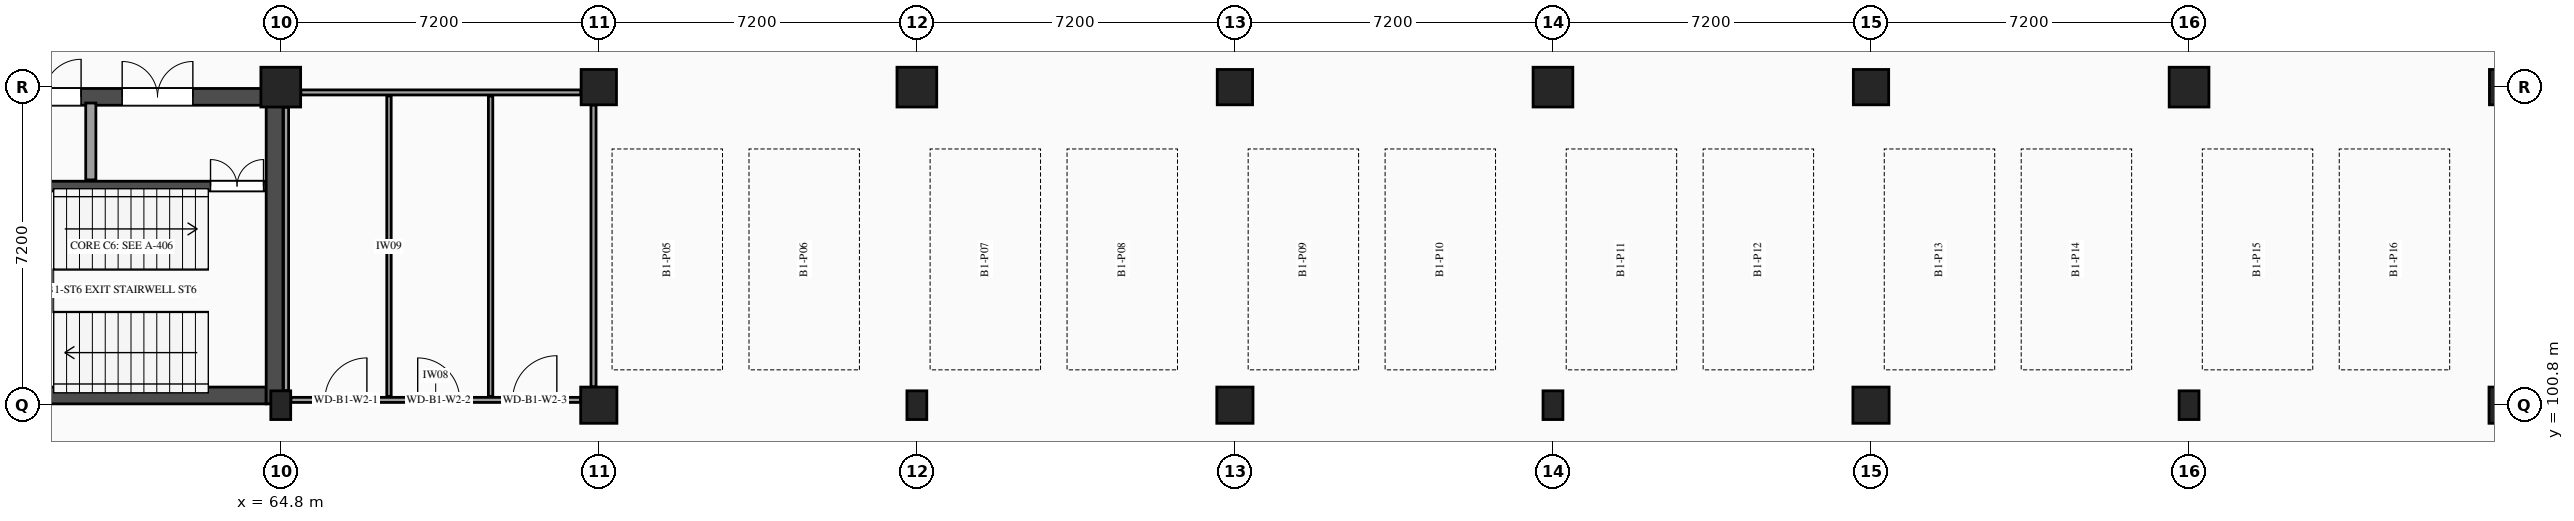
"""IFC4 building model, lengths in metres.
Left out: names, types, materials, properties, quantities, classifications, styles, units other than length and angle.
Written with IfcOpenShell. Run it as: python <this file> out.ifc"""

import sys

from ifc_helpers import new_model, si_unit, direction, frame, frame_2d, origin, origin_2d, place, context, subcontext, project, spatial, rectangle, extrude, element, fill, save


model = new_model("IFC4")
c1 = context("Model", 3, precision=1e-05, world=origin(), true_north=direction((0.0, 1.0)))
c2 = subcontext(c1, "Body", "Model", "MODEL_VIEW")
j1 = project(units=[si_unit("LENGTHUNIT", "METRE"), si_unit("PLANEANGLEUNIT", "RADIAN")], contexts=[c1])
p1 = place(None, origin())
s1 = spatial("IfcSite", under=j1, at=p1, CompositionType="ELEMENT")
p2 = place(p1, origin())
s2 = spatial("IfcBuilding", under=s1, at=p2, CompositionType="ELEMENT")
p3 = place(p2, frame((0.0, 0.0, -4.5)))
s3 = spatial("IfcBuildingStorey", under=s2, at=p3, CompositionType="ELEMENT", Elevation=-4.5)
p4 = place(p3, frame((64.8, 100.8, -0.45), z_axis=(0.0, 0.0, 1.0), x_axis=(1.0, 0.0, 0.0)))
e1 = element("IfcColumn", 1, at=p4, inside=s3, PredefinedType="PILASTER", context=c2, shape_type="SweptSolid", body=[
    extrude(rectangle(XDim=0.45, YDim=0.65, at=origin_2d()), origin(), (0.0, 0.0, 1.0), 4.95),
])
p5 = place(p3, frame((64.8, 108.0, -0.45), z_axis=(0.0, 0.0, 1.0), x_axis=(1.0, 0.0, 0.0)))
e2 = element("IfcColumn", 2, at=p5, inside=s3, PredefinedType="COLUMN", context=c2, shape_type="SweptSolid", body=[
    extrude(rectangle(XDim=0.9, YDim=0.9, at=origin_2d()), origin(), (0.0, 0.0, 1.0), 4.95),
])
p6 = place(p3, frame((72.0, 100.8, -0.45), z_axis=(0.0, 0.0, 1.0), x_axis=(1.0, 0.0, 0.0)))
e3 = element("IfcColumn", 3, at=p6, inside=s3, PredefinedType="COLUMN", context=c2, shape_type="SweptSolid", body=[
    extrude(rectangle(XDim=0.82, YDim=0.82, at=origin_2d()), origin(), (0.0, 0.0, 1.0), 4.95),
])
p7 = place(p3, frame((72.0, 108.0, -0.45), z_axis=(0.0, 0.0, 1.0), x_axis=(1.0, 0.0, 0.0)))
e4 = element("IfcColumn", 4, at=p7, inside=s3, PredefinedType="COLUMN", context=c2, shape_type="SweptSolid", body=[
    extrude(rectangle(XDim=0.8, YDim=0.8, at=origin_2d()), origin(), (0.0, 0.0, 1.0), 4.95),
])
p8 = place(p3, frame((79.2, 100.8, -0.45), z_axis=(0.0, 0.0, 1.0), x_axis=(1.0, 0.0, 0.0)))
e5 = element("IfcColumn", 5, at=p8, inside=s3, PredefinedType="PILASTER", context=c2, shape_type="SweptSolid", body=[
    extrude(rectangle(XDim=0.45, YDim=0.65, at=origin_2d()), origin(), (0.0, 0.0, 1.0), 4.95),
])
p9 = place(p3, frame((79.2, 108.0, -0.45), z_axis=(0.0, 0.0, 1.0), x_axis=(1.0, 0.0, 0.0)))
e6 = element("IfcColumn", 6, at=p9, inside=s3, PredefinedType="COLUMN", context=c2, shape_type="SweptSolid", body=[
    extrude(rectangle(XDim=0.9, YDim=0.9, at=origin_2d()), origin(), (0.0, 0.0, 1.0), 4.95),
])
p10 = place(p3, frame((86.4, 100.8, -0.45), z_axis=(0.0, 0.0, 1.0), x_axis=(1.0, 0.0, 0.0)))
e7 = element("IfcColumn", 7, at=p10, inside=s3, PredefinedType="COLUMN", context=c2, shape_type="SweptSolid", body=[
    extrude(rectangle(XDim=0.82, YDim=0.82, at=origin_2d()), origin(), (0.0, 0.0, 1.0), 4.95),
])
p11 = place(p3, frame((86.4, 108.0, -0.45), z_axis=(0.0, 0.0, 1.0), x_axis=(1.0, 0.0, 0.0)))
e8 = element("IfcColumn", 8, at=p11, inside=s3, PredefinedType="COLUMN", context=c2, shape_type="SweptSolid", body=[
    extrude(rectangle(XDim=0.8, YDim=0.8, at=origin_2d()), origin(), (0.0, 0.0, 1.0), 4.95),
])
p12 = place(p3, frame((93.6, 100.8, -0.45), z_axis=(0.0, 0.0, 1.0), x_axis=(1.0, 0.0, 0.0)))
e9 = element("IfcColumn", 9, at=p12, inside=s3, PredefinedType="PILASTER", context=c2, shape_type="SweptSolid", body=[
    extrude(rectangle(XDim=0.45, YDim=0.65, at=origin_2d()), origin(), (0.0, 0.0, 1.0), 4.95),
])
p13 = place(p3, frame((93.6, 108.0, -0.45), z_axis=(0.0, 0.0, 1.0), x_axis=(1.0, 0.0, 0.0)))
e10 = element("IfcColumn", 10, at=p13, inside=s3, PredefinedType="COLUMN", context=c2, shape_type="SweptSolid", body=[
    extrude(rectangle(XDim=0.9, YDim=0.9, at=origin_2d()), origin(), (0.0, 0.0, 1.0), 4.95),
])
p14 = place(p3, frame((100.8, 100.8, -0.45), z_axis=(0.0, 0.0, 1.0), x_axis=(1.0, 0.0, 0.0)))
e11 = element("IfcColumn", 11, at=p14, inside=s3, PredefinedType="COLUMN", context=c2, shape_type="SweptSolid", body=[
    extrude(rectangle(XDim=0.82, YDim=0.82, at=origin_2d()), origin(), (0.0, 0.0, 1.0), 4.95),
])
p15 = place(p3, frame((100.8, 108.0, -0.45), z_axis=(0.0, 0.0, 1.0), x_axis=(1.0, 0.0, 0.0)))
e12 = element("IfcColumn", 12, at=p15, inside=s3, PredefinedType="COLUMN", context=c2, shape_type="SweptSolid", body=[
    extrude(rectangle(XDim=0.8, YDim=0.8, at=origin_2d()), origin(), (0.0, 0.0, 1.0), 4.95),
])
p16 = place(p3, frame((108.0, 100.8, -0.45), z_axis=(0.0, 0.0, 1.0), x_axis=(1.0, 0.0, 0.0)))
e13 = element("IfcColumn", 13, at=p16, inside=s3, PredefinedType="PILASTER", context=c2, shape_type="SweptSolid", body=[
    extrude(rectangle(XDim=0.45, YDim=0.65, at=origin_2d()), origin(), (0.0, 0.0, 1.0), 4.95),
])
p17 = place(p3, frame((108.0, 108.0, -0.45), z_axis=(0.0, 0.0, 1.0), x_axis=(1.0, 0.0, 0.0)))
e14 = element("IfcColumn", 14, at=p17, inside=s3, PredefinedType="COLUMN", context=c2, shape_type="SweptSolid", body=[
    extrude(rectangle(XDim=0.9, YDim=0.9, at=origin_2d()), origin(), (0.0, 0.0, 1.0), 4.95),
])
p18 = place(p3, frame((115.2, 100.8, -0.45), z_axis=(0.0, 0.0, 1.0), x_axis=(1.0, 0.0, 0.0)))
e15 = element("IfcColumn", 15, at=p18, inside=s3, PredefinedType="COLUMN", context=c2, shape_type="SweptSolid", body=[
    extrude(rectangle(XDim=0.82, YDim=0.82, at=origin_2d()), origin(), (0.0, 0.0, 1.0), 4.95),
])
p19 = place(p3, frame((115.2, 108.0, -0.45), z_axis=(0.0, 0.0, 1.0), x_axis=(1.0, 0.0, 0.0)))
e16 = element("IfcColumn", 16, at=p19, inside=s3, PredefinedType="COLUMN", context=c2, shape_type="SweptSolid", body=[
    extrude(rectangle(XDim=0.8, YDim=0.8, at=origin_2d()), origin(), (0.0, 0.0, 1.0), 4.95),
])
p20 = place(p3, frame((58.01, 101.02, 0.0), z_axis=(0.0, 0.0, 1.0), x_axis=(1.0, 0.0, 0.0)))
e17 = element("IfcWall", 17, at=p20, inside=s3, PredefinedType="SHEAR", context=c2, shape_type="SweptSolid", body=[
    extrude(rectangle(XDim=6.46, YDim=0.38, at=frame_2d((3.23, 0.0))), origin(), (0.0, 0.0, 1.0), 4.17),
])
p21 = place(p3, frame((58.01, 107.78, 0.0), z_axis=(0.0, 0.0, 1.0), x_axis=(1.0, 0.0, 0.0)))
e18 = element("IfcWall", 18, at=p21, inside=s3, PredefinedType="SHEAR", context=c2, shape_type="SweptSolid", body=[
    extrude(rectangle(XDim=6.46, YDim=0.38, at=frame_2d((3.23, 0.0))), origin(), (0.0, 0.0, 1.0), 4.17),
])
p22 = place(p21, frame((1.42, 0.0, 0.0)))
e19 = element("IfcOpeningElement", 19, at=p22, cuts=e18, PredefinedType="OPENING", context=c2, shape_type="SweptSolid", body=[
    extrude(rectangle(XDim=0.85, YDim=2.1, at=frame_2d((0.425, 1.05))), frame((0.0, 0.2, 0.0), z_axis=(0.0, -1.0, 0.0), x_axis=(1.0, 0.0, 0.0)), (0.0, 0.0, 1.0), 0.4),
])
p23 = place(p21, frame((3.2, 0.0, 0.0)))
e20 = element("IfcOpeningElement", 20, at=p23, cuts=e18, PredefinedType="OPENING", context=c2, shape_type="SweptSolid", body=[
    extrude(rectangle(XDim=1.6, YDim=2.2, at=frame_2d((0.8, 1.1))), frame((0.0, 0.2, 0.0), z_axis=(0.0, -1.0, 0.0), x_axis=(1.0, 0.0, 0.0)), (0.0, 0.0, 1.0), 0.4),
])
p24 = place(p3, frame((58.01, 105.76, 0.0), z_axis=(0.0, 0.0, 1.0), x_axis=(1.0, 0.0, 0.0)))
e21 = element("IfcWall", 21, at=p24, inside=s3, PredefinedType="SHEAR", context=c2, shape_type="SweptSolid", body=[
    extrude(rectangle(XDim=6.46, YDim=0.22, at=frame_2d((3.23, 0.0))), origin(), (0.0, 0.0, 1.0), 4.17),
])
p25 = place(p24, frame((5.2, 0.0, 0.0)))
e22 = element("IfcOpeningElement", 22, at=p25, cuts=e21, PredefinedType="OPENING", context=c2, shape_type="SweptSolid", body=[
    extrude(rectangle(XDim=1.2, YDim=2.2, at=frame_2d((0.6, 1.1))), frame((0.0, 0.12, 0.0), z_axis=(0.0, -1.0, 0.0), x_axis=(1.0, 0.0, 0.0)), (0.0, 0.0, 1.0), 0.24),
])
p26 = place(p3, frame((60.5, 105.9, 0.0), z_axis=(0.0, 0.0, 1.0), x_axis=(0.0, 1.0, 0.0)))
e23 = element("IfcWall", 23, at=p26, inside=s3, PredefinedType="PARTITIONING", context=c2, shape_type="SweptSolid", body=[
    extrude(rectangle(XDim=1.74, YDim=0.23, at=frame_2d((0.87, 0.0))), origin(), (0.0, 0.0, 1.0), 4.17),
])
p27 = place(p3, frame((64.66, 100.83, 0.0), z_axis=(0.0, 0.0, 1.0), x_axis=(0.0, 1.0, 0.0)))
e24 = element("IfcWall", 24, at=p27, inside=s3, PredefinedType="SHEAR", context=c2, shape_type="SweptSolid", body=[
    extrude(rectangle(XDim=7.14, YDim=0.38, at=frame_2d((3.57, 0.0))), origin(), (0.0, 0.0, 1.0), 4.17),
])
p28 = place(p3, frame((65.03, 100.92, 0.0), z_axis=(0.0, 0.0, 1.0), x_axis=(1.0, 0.0, 0.0)))
e25 = element("IfcWall", 25, at=p28, inside=s3, PredefinedType="PARTITIONING", context=c2, shape_type="SweptSolid", body=[
    extrude(rectangle(XDim=6.555, YDim=0.115, at=frame_2d((3.277, 0.0))), origin(), (0.0, 0.0, 1.0), 3.53),
])
p29 = place(p28, frame((0.77, 0.0, 0.0)))
e26 = element("IfcOpeningElement", 26, at=p29, cuts=e25, PredefinedType="OPENING", context=c2, shape_type="SweptSolid", body=[
    extrude(rectangle(XDim=0.95, YDim=2.1, at=frame_2d((0.475, 1.05))), frame((0.0, 0.067, 0.0), z_axis=(0.0, -1.0, 0.0), x_axis=(1.0, 0.0, 0.0)), (0.0, 0.0, 1.0), 0.135),
])
p30 = place(p28, frame((2.87, 0.0, 0.0)))
e27 = element("IfcOpeningElement", 27, at=p30, cuts=e25, PredefinedType="OPENING", context=c2, shape_type="SweptSolid", body=[
    extrude(rectangle(XDim=0.95, YDim=2.1, at=frame_2d((0.475, 1.05))), frame((0.0, 0.067, 0.0), z_axis=(0.0, -1.0, 0.0), x_axis=(1.0, 0.0, 0.0)), (0.0, 0.0, 1.0), 0.135),
])
p31 = place(p28, frame((5.02, 0.0, 0.0)))
e28 = element("IfcOpeningElement", 28, at=p31, cuts=e25, PredefinedType="OPENING", context=c2, shape_type="SweptSolid", body=[
    extrude(rectangle(XDim=1.0, YDim=2.15, at=frame_2d((0.5, 1.075))), frame((0.0, 0.067, 0.0), z_axis=(0.0, -1.0, 0.0), x_axis=(1.0, 0.0, 0.0)), (0.0, 0.0, 1.0), 0.135),
])
p32 = place(p3, frame((65.255, 107.88, 0.0), z_axis=(0.0, 0.0, 1.0), x_axis=(1.0, 0.0, 0.0)))
e29 = element("IfcWall", 29, at=p32, inside=s3, PredefinedType="PARTITIONING", context=c2, shape_type="SweptSolid", body=[
    extrude(rectangle(XDim=6.34, YDim=0.115, at=frame_2d((3.17, 0.0))), origin(), (0.0, 0.0, 1.0), 3.53),
])
p33 = place(p3, frame((64.92, 101.13, 0.0), z_axis=(0.0, 0.0, 1.0), x_axis=(0.0, 1.0, 0.0)))
e30 = element("IfcWall", 30, at=p33, inside=s3, PredefinedType="PARTITIONING", context=c2, shape_type="SweptSolid", body=[
    extrude(rectangle(XDim=6.415, YDim=0.115, at=frame_2d((3.208, 0.0))), origin(), (0.0, 0.0, 1.0), 3.54),
])
p34 = place(p3, frame((71.88, 101.215, 0.0), z_axis=(0.0, 0.0, 1.0), x_axis=(0.0, 1.0, 0.0)))
e31 = element("IfcWall", 31, at=p34, inside=s3, PredefinedType="PARTITIONING", context=c2, shape_type="SweptSolid", body=[
    extrude(rectangle(XDim=6.38, YDim=0.115, at=frame_2d((3.19, 0.0))), origin(), (0.0, 0.0, 1.0), 3.54),
])
for number, where, z_axis, x_axis in (
    (32, (67.25, 101.0, 0.0), (0.0, 0.0, 1.0), (0.0, 1.0, 0.0)),
    (33, (69.55, 101.0, 0.0), (0.0, 0.0, 1.0), (0.0, 1.0, 0.0)),
):
    element("IfcWall", number, at=place(p3, frame(where, z_axis=z_axis, x_axis=x_axis)), inside=s3, PredefinedType="PARTITIONING", context=c2, shape_type="SweptSolid", body=[
        extrude(rectangle(XDim=6.8, YDim=0.1, at=frame_2d((3.4, 0.0))), origin(), (0.0, 0.0, 1.0), 4.17),
    ])
p35 = place(p22, origin())
e34 = element("IfcDoor", 34, at=p35, inside=s3, OperationType="SINGLE_SWING_RIGHT", PredefinedType="DOOR", context=c2, shape_type="SweptSolid", body=[
    extrude(rectangle(XDim=0.85, YDim=2.1, at=frame_2d((0.425, 1.05))), frame((0.0, 0.025, 0.0), z_axis=(0.0, -1.0, 0.0), x_axis=(1.0, 0.0, 0.0)), (0.0, 0.0, 1.0), 0.05),
])
fill(e19, e34)
p36 = place(p25, origin())
e35 = element("IfcDoor", 35, at=p36, inside=s3, OperationType="DOUBLE_DOOR_SINGLE_SWING", PredefinedType="DOOR", context=c2, shape_type="SweptSolid", body=[
    extrude(rectangle(XDim=1.2, YDim=2.2, at=frame_2d((0.6, 1.1))), frame((0.0, 0.025, 0.0), z_axis=(0.0, -1.0, 0.0), x_axis=(1.0, 0.0, 0.0)), (0.0, 0.0, 1.0), 0.05),
])
fill(e22, e35)
p37 = place(p23, frame((1.6, 0.0, 0.0), z_axis=(0.0, 0.0, 1.0), x_axis=(-1.0, 0.0, 0.0)))
e36 = element("IfcDoor", 36, at=p37, inside=s3, OperationType="DOUBLE_DOOR_SINGLE_SWING", PredefinedType="DOOR", context=c2, shape_type="SweptSolid", body=[
    extrude(rectangle(XDim=1.6, YDim=2.2, at=frame_2d((0.8, 1.1))), frame((0.0, 0.025, 0.0), z_axis=(0.0, -1.0, 0.0), x_axis=(1.0, 0.0, 0.0)), (0.0, 0.0, 1.0), 0.05),
])
fill(e20, e36)
p38 = place(p29, origin())
e37 = element("IfcDoor", 37, at=p38, inside=s3, OperationType="SINGLE_SWING_RIGHT", PredefinedType="DOOR", context=c2, shape_type="SweptSolid", body=[
    extrude(rectangle(XDim=0.95, YDim=2.1, at=frame_2d((0.475, 1.05))), frame((0.0, 0.025, 0.0), z_axis=(0.0, -1.0, 0.0), x_axis=(1.0, 0.0, 0.0)), (0.0, 0.0, 1.0), 0.05),
])
fill(e26, e37)
p39 = place(p30, origin())
e38 = element("IfcDoor", 38, at=p39, inside=s3, OperationType="SINGLE_SWING_LEFT", PredefinedType="DOOR", context=c2, shape_type="SweptSolid", body=[
    extrude(rectangle(XDim=0.95, YDim=2.1, at=frame_2d((0.475, 1.05))), frame((0.0, 0.025, 0.0), z_axis=(0.0, -1.0, 0.0), x_axis=(1.0, 0.0, 0.0)), (0.0, 0.0, 1.0), 0.05),
])
fill(e27, e38)
p40 = place(p31, origin())
e39 = element("IfcDoor", 39, at=p40, inside=s3, OperationType="SINGLE_SWING_RIGHT", PredefinedType="DOOR", context=c2, shape_type="SweptSolid", body=[
    extrude(rectangle(XDim=1.0, YDim=2.15, at=frame_2d((0.5, 1.075))), frame((0.0, 0.025, 0.0), z_axis=(0.0, -1.0, 0.0), x_axis=(1.0, 0.0, 0.0)), (0.0, 0.0, 1.0), 0.05),
])
fill(e28, e39)
save(model, sys.argv[1])
